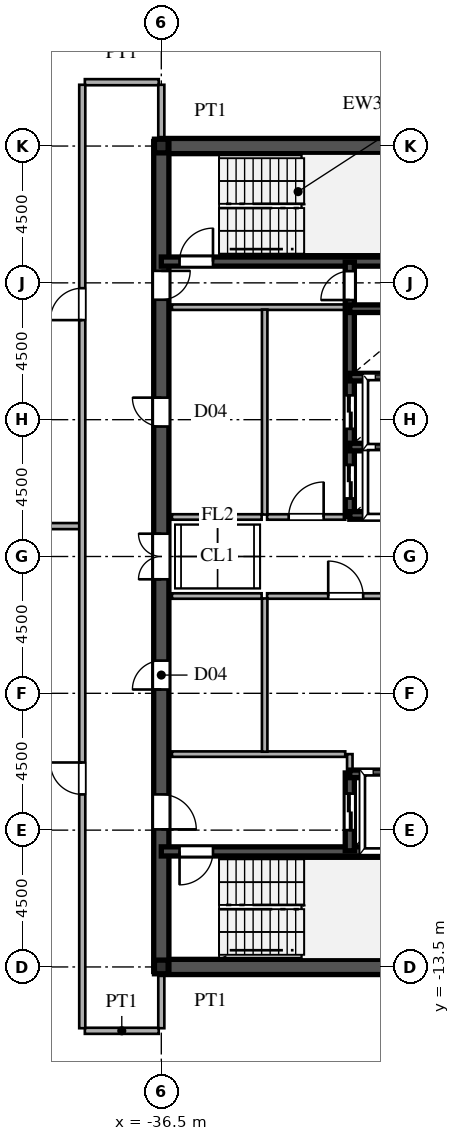
"""IFC4 building model, lengths in metres.
Left out: names, types, materials, properties, quantities, classifications, styles, units other than length and angle.
Written with IfcOpenShell. Run it as: python <this file> out.ifc"""

import sys

from ifc_helpers import new_model, si_unit, direction, frame, frame_2d, origin, origin_2d, place, context, subcontext, project, spatial, rectangle, i_section, extrude, source, transform, mapped, element, fill, save


model = new_model("IFC4")
c1 = context("Model", 3, precision=1e-05, world=origin(), true_north=direction((0.0, 1.0)))
c2 = subcontext(c1, "Body", "Model", "MODEL_VIEW")
j1 = project(units=[si_unit("LENGTHUNIT", "METRE"), si_unit("PLANEANGLEUNIT", "RADIAN")], contexts=[c1])
p1 = place(None, origin())
s1 = spatial("IfcSite", under=j1, at=p1, CompositionType="ELEMENT")
p2 = place(p1, origin())
s2 = spatial("IfcBuilding", under=s1, at=p2, CompositionType="ELEMENT")
p3 = place(p2, frame((0.0, 0.0, 265.65)))
s3 = spatial("IfcBuildingStorey", under=s2, at=p3, CompositionType="ELEMENT", Elevation=265.65)
m1 = source(origin(), c2, "Body", "SweptSolid", [
    extrude(i_section(OverallWidth=0.45, OverallDepth=0.45, WebThickness=0.016, FlangeThickness=0.025, at=origin_2d()), origin(), (0.0, 0.0, 1.0), 3.75),
])
for number, where, z_axis, x_axis in (
    (1, (-36.5, -13.5, 0.0), (0.0, 0.0, 1.0), (1.0, 0.0, 0.0)),
    (2, (-36.5, 13.5, 0.0), (0.0, 0.0, 1.0), (1.0, 0.0, 0.0)),
):
    element("IfcColumn", number, at=place(p3, frame(where, z_axis=z_axis, x_axis=x_axis)), inside=s3, PredefinedType="COLUMN", context=c2, shape_type="MappedRepresentation", body=[
        mapped(m1, transform((0.0, 0.0, 0.0), scale=1.0)),
    ])
for number, where, z_axis, x_axis in (
    (3, (-36.5, -13.5, 0.0), (0.0, 0.0, 1.0), (1.0, 0.0, 0.0)),
    (4, (-36.5, 13.5, 0.0), (0.0, 0.0, 1.0), (1.0, 0.0, 0.0)),
):
    element("IfcWall", number, at=place(p3, frame(where, z_axis=z_axis, x_axis=x_axis)), inside=s3, PredefinedType="SHEAR", context=c2, shape_type="SweptSolid", body=[
        extrude(rectangle(XDim=9.0, YDim=0.5, at=frame_2d((4.5, 0.0))), origin(), (0.0, 0.0, 1.0), 3.49),
    ])
p4 = place(p3, frame((-36.5, -13.65, 0.0), z_axis=(0.0, 0.0, 1.0), x_axis=(0.0, 1.0, 0.0)))
e5 = element("IfcWall", 5, at=p4, inside=s3, PredefinedType="SHEAR", context=c2, shape_type="SweptSolid", body=[
    extrude(rectangle(XDim=7.15, YDim=0.5, at=frame_2d((3.575, 0.0))), origin(), (0.0, 0.0, 1.0), 3.49),
])
p5 = place(p4, frame((4.675, 0.0, 0.0)))
e6 = element("IfcOpeningElement", 6, at=p5, cuts=e5, PredefinedType="OPENING", context=c2, shape_type="SweptSolid", body=[
    extrude(rectangle(XDim=1.15, YDim=2.2, at=frame_2d((0.575, 1.1))), frame((0.0, 0.26, 0.0), z_axis=(0.0, -1.0, 0.0), x_axis=(1.0, 0.0, 0.0)), (0.0, 0.0, 1.0), 0.52),
])
p6 = place(p3, frame((-36.5, -1.3, 0.0), z_axis=(0.0, 0.0, 1.0), x_axis=(0.0, 1.0, 0.0)))
e7 = element("IfcWall", 7, at=p6, inside=s3, PredefinedType="SHEAR", context=c2, shape_type="SweptSolid", body=[
    extrude(rectangle(XDim=2.6, YDim=0.5, at=frame_2d((1.3, 0.0))), origin(), (0.0, 0.0, 1.0), 3.49),
])
p7 = place(p6, frame((0.55, 0.0, 0.0)))
e8 = element("IfcOpeningElement", 8, at=p7, cuts=e7, PredefinedType="OPENING", context=c2, shape_type="SweptSolid", body=[
    extrude(rectangle(XDim=1.5, YDim=2.3, at=frame_2d((0.75, 1.15))), frame((0.0, 0.26, 0.0), z_axis=(0.0, -1.0, 0.0), x_axis=(1.0, 0.0, 0.0)), (0.0, 0.0, 1.0), 0.52),
])
p8 = place(p3, frame((-36.5, 8.2, 0.0), z_axis=(0.0, 0.0, 1.0), x_axis=(0.0, 1.0, 0.0)))
e9 = element("IfcWall", 9, at=p8, inside=s3, PredefinedType="SHEAR", context=c2, shape_type="SweptSolid", body=[
    extrude(rectangle(XDim=5.45, YDim=0.5, at=frame_2d((2.725, 0.0))), origin(), (0.0, 0.0, 1.0), 3.49),
])
p9 = place(p8, frame((0.245, 0.0, 0.0)))
e10 = element("IfcOpeningElement", 10, at=p9, cuts=e9, PredefinedType="OPENING", context=c2, shape_type="SweptSolid", body=[
    extrude(rectangle(XDim=0.95, YDim=2.15, at=frame_2d((0.475, 1.075))), frame((0.0, 0.26, 0.0), z_axis=(0.0, -1.0, 0.0), x_axis=(1.0, 0.0, 0.0)), (0.0, 0.0, 1.0), 0.52),
])
p10 = place(p3, frame((-36.5, -6.5, 0.0), z_axis=(0.0, 0.0, 1.0), x_axis=(0.0, 1.0, 0.0)))
e11 = element("IfcWall", 11, at=p10, inside=s3, PredefinedType="SHEAR", context=c2, shape_type="SweptSolid", body=[
    extrude(rectangle(XDim=5.2, YDim=0.5, at=frame_2d((2.6, 0.0))), origin(), (0.0, 0.0, 1.0), 3.49),
])
p11 = place(p10, frame((2.125, 0.0, 0.0)))
e12 = element("IfcOpeningElement", 12, at=p11, cuts=e11, PredefinedType="OPENING", context=c2, shape_type="SweptSolid", body=[
    extrude(rectangle(XDim=0.95, YDim=2.15, at=frame_2d((0.475, 1.075))), frame((0.0, 0.26, 0.0), z_axis=(0.0, -1.0, 0.0), x_axis=(1.0, 0.0, 0.0)), (0.0, 0.0, 1.0), 0.52),
])
p12 = place(p3, frame((-36.5, 1.3, 0.0), z_axis=(0.0, 0.0, 1.0), x_axis=(0.0, 1.0, 0.0)))
e13 = element("IfcWall", 13, at=p12, inside=s3, PredefinedType="SHEAR", context=c2, shape_type="SweptSolid", body=[
    extrude(rectangle(XDim=6.9, YDim=0.5, at=frame_2d((3.45, 0.0))), origin(), (0.0, 0.0, 1.0), 3.49),
])
p13 = place(p12, frame((2.975, 0.0, 0.0)))
e14 = element("IfcOpeningElement", 14, at=p13, cuts=e13, PredefinedType="OPENING", context=c2, shape_type="SweptSolid", body=[
    extrude(rectangle(XDim=0.95, YDim=2.15, at=frame_2d((0.475, 1.075))), frame((0.0, 0.26, 0.0), z_axis=(0.0, -1.0, 0.0), x_axis=(1.0, 0.0, 0.0)), (0.0, 0.0, 1.0), 0.52),
])
p14 = place(p3, frame((-36.5, -9.7, 0.0), z_axis=(0.0, 0.0, 1.0), x_axis=(1.0, 0.0, 0.0)))
e15 = element("IfcWall", 15, at=p14, inside=s3, PredefinedType="SHEAR", context=c2, shape_type="SweptSolid", body=[
    extrude(rectangle(XDim=9.0, YDim=0.3, at=frame_2d((4.5, 0.0))), origin(), (0.0, 0.0, 1.0), 3.49),
])
p15 = place(p14, frame((0.6, 0.0, 0.0)))
e16 = element("IfcOpeningElement", 16, at=p15, cuts=e15, PredefinedType="OPENING", context=c2, shape_type="SweptSolid", body=[
    extrude(rectangle(XDim=1.1, YDim=2.2, at=frame_2d((0.55, 1.1))), frame((0.0, 0.16, 0.0), z_axis=(0.0, -1.0, 0.0), x_axis=(1.0, 0.0, 0.0)), (0.0, 0.0, 1.0), 0.32),
])
p16 = place(p3, frame((-36.5, 9.7, 0.0), z_axis=(0.0, 0.0, 1.0), x_axis=(1.0, 0.0, 0.0)))
e17 = element("IfcWall", 17, at=p16, inside=s3, PredefinedType="SHEAR", context=c2, shape_type="SweptSolid", body=[
    extrude(rectangle(XDim=9.0, YDim=0.3, at=frame_2d((4.5, 0.0))), origin(), (0.0, 0.0, 1.0), 3.49),
])
p17 = place(p16, frame((0.6, 0.0, 0.0)))
e18 = element("IfcOpeningElement", 18, at=p17, cuts=e17, PredefinedType="OPENING", context=c2, shape_type="SweptSolid", body=[
    extrude(rectangle(XDim=1.1, YDim=2.2, at=frame_2d((0.55, 1.1))), frame((0.0, 0.16, 0.0), z_axis=(0.0, -1.0, 0.0), x_axis=(1.0, 0.0, 0.0)), (0.0, 0.0, 1.0), 0.32),
])
for number, where, z_axis, x_axis in (
    (19, (-30.3, -7.15, 0.0), (0.0, 0.0, 1.0), (1.0, 0.0, 0.0)),
    (20, (-30.3, 1.35, 0.0), (0.0, 0.0, 1.0), (1.0, 0.0, 0.0)),
    (21, (-30.3, 3.6, 0.0), (0.0, 0.0, 1.0), (1.0, 0.0, 0.0)),
    (22, (-30.3, 5.9, 0.0), (0.0, 0.0, 1.0), (1.0, 0.0, 0.0)),
    (23, (-30.3, 8.15, 0.0), (0.0, 0.0, 1.0), (1.0, 0.0, 0.0)),
):
    element("IfcWall", number, at=place(p3, frame(where, z_axis=z_axis, x_axis=x_axis)), inside=s3, PredefinedType="SHEAR", context=c2, shape_type="SweptSolid", body=[
        extrude(rectangle(XDim=2.8, YDim=0.25, at=frame_2d((1.4, 0.0))), origin(), (0.0, 0.0, 1.0), 3.49),
    ])
p18 = place(p3, frame((-30.3, -9.68, 0.0), z_axis=(0.0, 0.0, 1.0), x_axis=(0.0, 1.0, 0.0)))
e24 = element("IfcWall", 24, at=p18, inside=s3, PredefinedType="SHEAR", context=c2, shape_type="SweptSolid", body=[
    extrude(rectangle(XDim=2.56, YDim=0.3, at=frame_2d((1.28, 0.0))), origin(), (0.0, 0.0, 1.0), 3.49),
])
p19 = place(p18, frame((0.68, 0.0, 0.0)))
e25 = element("IfcOpeningElement", 25, at=p19, cuts=e24, PredefinedType="OPENING", context=c2, shape_type="SweptSolid", body=[
    extrude(rectangle(XDim=1.2, YDim=2.25, at=frame_2d((0.6, 1.125))), frame((0.0, 0.16, 0.0), z_axis=(0.0, -1.0, 0.0), x_axis=(1.0, 0.0, 0.0)), (0.0, 0.0, 1.0), 0.32),
])
p20 = place(p3, frame((-30.3, 1.32, 0.0), z_axis=(0.0, 0.0, 1.0), x_axis=(0.0, 1.0, 0.0)))
e26 = element("IfcWall", 26, at=p20, inside=s3, PredefinedType="SHEAR", context=c2, shape_type="SweptSolid", body=[
    extrude(rectangle(XDim=2.28, YDim=0.3, at=frame_2d((1.14, 0.0))), origin(), (0.0, 0.0, 1.0), 3.49),
])
p21 = place(p20, frame((0.59, 0.0, 0.0)))
e27 = element("IfcOpeningElement", 27, at=p21, cuts=e26, PredefinedType="OPENING", context=c2, shape_type="SweptSolid", body=[
    extrude(rectangle(XDim=1.1, YDim=2.2, at=frame_2d((0.55, 1.1))), frame((0.0, 0.16, 0.0), z_axis=(0.0, -1.0, 0.0), x_axis=(1.0, 0.0, 0.0)), (0.0, 0.0, 1.0), 0.32),
])
p22 = place(p3, frame((-30.3, 3.6, 0.0), z_axis=(0.0, 0.0, 1.0), x_axis=(0.0, 1.0, 0.0)))
e28 = element("IfcWall", 28, at=p22, inside=s3, PredefinedType="SHEAR", context=c2, shape_type="SweptSolid", body=[
    extrude(rectangle(XDim=2.3, YDim=0.3, at=frame_2d((1.15, 0.0))), origin(), (0.0, 0.0, 1.0), 3.49),
])
p23 = place(p22, frame((0.6, 0.0, 0.0)))
e29 = element("IfcOpeningElement", 29, at=p23, cuts=e28, PredefinedType="OPENING", context=c2, shape_type="SweptSolid", body=[
    extrude(rectangle(XDim=1.1, YDim=2.2, at=frame_2d((0.55, 1.1))), frame((0.0, 0.16, 0.0), z_axis=(0.0, -1.0, 0.0), x_axis=(1.0, 0.0, 0.0)), (0.0, 0.0, 1.0), 0.32),
])
p24 = place(p3, frame((-30.3, 5.9, 0.0), z_axis=(0.0, 0.0, 1.0), x_axis=(0.0, 1.0, 0.0)))
e30 = element("IfcWall", 30, at=p24, inside=s3, PredefinedType="SHEAR", context=c2, shape_type="SweptSolid", body=[
    extrude(rectangle(XDim=2.25, YDim=0.3, at=frame_2d((1.125, 0.0))), origin(), (0.0, 0.0, 1.0), 3.49),
])
p25 = place(p3, frame((-30.3, 8.15, 0.0), z_axis=(0.0, 0.0, 1.0), x_axis=(0.0, 1.0, 0.0)))
e31 = element("IfcWall", 31, at=p25, inside=s3, PredefinedType="SHEAR", context=c2, shape_type="SweptSolid", body=[
    extrude(rectangle(XDim=1.53, YDim=0.3, at=frame_2d((0.765, 0.0))), origin(), (0.0, 0.0, 1.0), 3.49),
])
p26 = place(p25, frame((0.285, 0.0, 0.0)))
e32 = element("IfcOpeningElement", 32, at=p26, cuts=e31, PredefinedType="OPENING", context=c2, shape_type="SweptSolid", body=[
    extrude(rectangle(XDim=0.95, YDim=2.15, at=frame_2d((0.475, 1.075))), frame((0.0, 0.16, 0.0), z_axis=(0.0, -1.0, 0.0), x_axis=(1.0, 0.0, 0.0)), (0.0, 0.0, 1.0), 0.32),
])
p27 = place(p3, frame((-36.15, -6.5, 0.0), z_axis=(0.0, 0.0, 1.0), x_axis=(1.0, 0.0, 0.0)))
e33 = element("IfcWall", 33, at=p27, inside=s3, PredefinedType="PARTITIONING", context=c2, shape_type="SweptSolid", body=[
    extrude(rectangle(XDim=5.7, YDim=0.18, at=frame_2d((2.85, 0.0))), origin(), (0.0, 0.0, 1.0), 3.49),
])
p28 = place(p3, frame((-30.3, -7.12, 0.0), z_axis=(0.0, 0.0, 1.0), x_axis=(0.0, 1.0, 0.0)))
e34 = element("IfcWall", 34, at=p28, inside=s3, PredefinedType="PARTITIONING", context=c2, shape_type="SweptSolid", body=[
    extrude(rectangle(XDim=0.62, YDim=0.18, at=frame_2d((0.31, 0.0))), origin(), (0.0, 0.0, 1.0), 3.49),
])
p29 = place(p3, frame((-36.15, 8.2, 0.0), z_axis=(0.0, 0.0, 1.0), x_axis=(1.0, 0.0, 0.0)))
e35 = element("IfcWall", 35, at=p29, inside=s3, PredefinedType="PARTITIONING", context=c2, shape_type="SweptSolid", body=[
    extrude(rectangle(XDim=5.7, YDim=0.18, at=frame_2d((2.85, 0.0))), origin(), (0.0, 0.0, 1.0), 3.49),
])
p30 = place(p3, frame((-33.1, -6.42, 0.0), z_axis=(0.0, 0.0, 1.0), x_axis=(0.0, 1.0, 0.0)))
e36 = element("IfcWall", 36, at=p30, inside=s3, PredefinedType="PARTITIONING", context=c2, shape_type="SweptSolid", body=[
    extrude(rectangle(XDim=5.04, YDim=0.18, at=frame_2d((2.52, 0.0))), origin(), (0.0, 0.0, 1.0), 3.49),
])
p31 = place(p3, frame((-33.1, 1.38, 0.0), z_axis=(0.0, 0.0, 1.0), x_axis=(0.0, 1.0, 0.0)))
e37 = element("IfcWall", 37, at=p31, inside=s3, PredefinedType="PARTITIONING", context=c2, shape_type="SweptSolid", body=[
    extrude(rectangle(XDim=6.74, YDim=0.18, at=frame_2d((3.37, 0.0))), origin(), (0.0, 0.0, 1.0), 3.49),
])
p32 = place(p3, frame((-33.02, -1.3, 0.0), z_axis=(0.0, 0.0, 1.0), x_axis=(1.0, 0.0, 0.0)))
e38 = element("IfcWall", 38, at=p32, inside=s3, PredefinedType="PARTITIONING", context=c2, shape_type="SweptSolid", body=[
    extrude(rectangle(XDim=5.17, YDim=0.18, at=frame_2d((2.585, 0.0))), origin(), (0.0, 0.0, 1.0), 3.49),
])
p33 = place(p32, frame((2.01, 0.0, 0.0)))
e39 = element("IfcOpeningElement", 39, at=p33, cuts=e38, PredefinedType="OPENING", context=c2, shape_type="SweptSolid", body=[
    extrude(rectangle(XDim=1.15, YDim=2.2, at=frame_2d((0.575, 1.1))), frame((0.0, 0.1, 0.0), z_axis=(0.0, -1.0, 0.0), x_axis=(1.0, 0.0, 0.0)), (0.0, 0.0, 1.0), 0.2),
])
p34 = place(p3, frame((-33.02, 1.3, 0.0), z_axis=(0.0, 0.0, 1.0), x_axis=(1.0, 0.0, 0.0)))
e40 = element("IfcWall", 40, at=p34, inside=s3, PredefinedType="PARTITIONING", context=c2, shape_type="SweptSolid", body=[
    extrude(rectangle(XDim=2.57, YDim=0.18, at=frame_2d((1.285, 0.0))), origin(), (0.0, 0.0, 1.0), 3.49),
])
p35 = place(p34, frame((0.71, 0.0, 0.0)))
e41 = element("IfcOpeningElement", 41, at=p35, cuts=e40, PredefinedType="OPENING", context=c2, shape_type="SweptSolid", body=[
    extrude(rectangle(XDim=1.15, YDim=2.2, at=frame_2d((0.575, 1.1))), frame((0.0, 0.1, 0.0), z_axis=(0.0, -1.0, 0.0), x_axis=(1.0, 0.0, 0.0)), (0.0, 0.0, 1.0), 0.2),
])
for number, where, z_axis, x_axis in (
    (42, (-36.15, -1.3, 0.0), (0.0, 0.0, 1.0), (1.0, 0.0, 0.0)),
    (43, (-36.15, 1.3, 0.0), (0.0, 0.0, 1.0), (1.0, 0.0, 0.0)),
):
    element("IfcWall", number, at=place(p3, frame(where, z_axis=z_axis, x_axis=x_axis)), inside=s3, PredefinedType="PARTITIONING", context=c2, shape_type="SweptSolid", body=[
        extrude(rectangle(XDim=2.95, YDim=0.18, at=frame_2d((1.475, 0.0))), origin(), (0.0, 0.0, 1.0), 3.49),
    ])
p36 = place(p3, frame((-39.015, -15.6, 0.0), z_axis=(0.0, 0.0, 1.0), x_axis=(1.0, 0.0, 0.0)))
e44 = element("IfcWall", 44, at=p36, inside=s3, PredefinedType="PARTITIONING", context=c2, shape_type="SweptSolid", body=[
    extrude(rectangle(XDim=2.43, YDim=0.2, at=frame_2d((1.215, 0.0))), origin(), (0.0, 0.0, 1.0), 3.49),
])
p37 = place(p3, frame((-67.375, 1.0, 0.0), z_axis=(0.0, 0.0, 1.0), x_axis=(1.0, 0.0, 0.0)))
e45 = element("IfcWall", 45, at=p37, inside=s3, PredefinedType="PARTITIONING", context=c2, shape_type="SweptSolid", body=[
    extrude(rectangle(XDim=28.195, YDim=0.2, at=frame_2d((14.098, 0.0))), origin(), (0.0, 0.0, 1.0), 3.49),
])
p38 = place(p3, frame((-39.015, 15.6, 0.0), z_axis=(0.0, 0.0, 1.0), x_axis=(1.0, 0.0, 0.0)))
e46 = element("IfcWall", 46, at=p38, inside=s3, PredefinedType="PARTITIONING", context=c2, shape_type="SweptSolid", body=[
    extrude(rectangle(XDim=2.43, YDim=0.2, at=frame_2d((1.215, 0.0))), origin(), (0.0, 0.0, 1.0), 3.49),
])
p39 = place(p3, frame((-39.1, -15.515, 0.0), z_axis=(0.0, 0.0, 1.0), x_axis=(0.0, 1.0, 0.0)))
e47 = element("IfcWall", 47, at=p39, inside=s3, PredefinedType="PARTITIONING", context=c2, shape_type="SweptSolid", body=[
    extrude(rectangle(XDim=31.03, YDim=0.2, at=frame_2d((15.515, 0.0))), origin(), (0.0, 0.0, 1.0), 3.49),
])
p40 = place(p39, frame((7.69, 0.0, 0.0)))
e48 = element("IfcOpeningElement", 48, at=p40, cuts=e47, PredefinedType="OPENING", context=c2, shape_type="SweptSolid", body=[
    extrude(rectangle(XDim=1.05, YDim=2.25, at=frame_2d((0.525, 1.125))), frame((0.0, 0.11, 0.0), z_axis=(0.0, -1.0, 0.0), x_axis=(1.0, 0.0, 0.0)), (0.0, 0.0, 1.0), 0.22),
])
p41 = place(p39, frame((23.29, 0.0, 0.0)))
e49 = element("IfcOpeningElement", 49, at=p41, cuts=e47, PredefinedType="OPENING", context=c2, shape_type="SweptSolid", body=[
    extrude(rectangle(XDim=1.05, YDim=2.25, at=frame_2d((0.525, 1.125))), frame((0.0, 0.11, 0.0), z_axis=(0.0, -1.0, 0.0), x_axis=(1.0, 0.0, 0.0)), (0.0, 0.0, 1.0), 0.22),
])
for number, where, z_axis, x_axis in (
    (50, (-36.5, -15.515, 0.0), (0.0, 0.0, 1.0), (0.0, 1.0, 0.0)),
    (51, (-36.5, 13.755, 0.0), (0.0, 0.0, 1.0), (0.0, 1.0, 0.0)),
):
    element("IfcWall", number, at=place(p3, frame(where, z_axis=z_axis, x_axis=x_axis)), inside=s3, PredefinedType="PARTITIONING", context=c2, shape_type="SweptSolid", body=[
        extrude(rectangle(XDim=1.76, YDim=0.2, at=frame_2d((0.88, 0.0))), origin(), (0.0, 0.0, 1.0), 2.89),
    ])
m2 = source(origin(), c2, "Body", "SweptSolid", [
    extrude(rectangle(XDim=1.15, YDim=2.2, at=frame_2d((0.575, 1.1))), frame((0.0, 0.025, 0.0), z_axis=(0.0, -1.0, 0.0), x_axis=(1.0, 0.0, 0.0)), (0.0, 0.0, 1.0), 0.05),
])
p42 = place(p5, frame((1.15, 0.0, 0.0), z_axis=(0.0, 0.0, 1.0), x_axis=(-1.0, 0.0, 0.0)))
e52 = element("IfcDoor", 52, at=p42, inside=s3, OperationType="SINGLE_SWING_LEFT", PredefinedType="DOOR", context=c2, shape_type="MappedRepresentation", body=[
    mapped(m2, transform((0.0, 0.0, 0.0), scale=1.0)),
])
fill(e6, e52)
m3 = source(origin(), c2, "Body", "SweptSolid", [
    extrude(rectangle(XDim=1.5, YDim=2.3, at=frame_2d((0.75, 1.15))), frame((0.0, 0.025, 0.0), z_axis=(0.0, -1.0, 0.0), x_axis=(1.0, 0.0, 0.0)), (0.0, 0.0, 1.0), 0.05),
])
p43 = place(p7, origin())
e53 = element("IfcDoor", 53, at=p43, inside=s3, OperationType="DOUBLE_SWING_LEFT", PredefinedType="DOOR", context=c2, shape_type="MappedRepresentation", body=[
    mapped(m3, transform((0.0, 0.0, 0.0), scale=1.0)),
])
fill(e8, e53)
m4 = source(origin(), c2, "Body", "SweptSolid", [
    extrude(rectangle(XDim=0.95, YDim=2.15, at=frame_2d((0.475, 1.075))), frame((0.0, 0.025, 0.0), z_axis=(0.0, -1.0, 0.0), x_axis=(1.0, 0.0, 0.0)), (0.0, 0.0, 1.0), 0.05),
])
p44 = place(p9, frame((0.95, 0.0, 0.0), z_axis=(0.0, 0.0, 1.0), x_axis=(-1.0, 0.0, 0.0)))
e54 = element("IfcDoor", 54, at=p44, inside=s3, OperationType="SINGLE_SWING_RIGHT", PredefinedType="DOOR", context=c2, shape_type="MappedRepresentation", body=[
    mapped(m4, transform((0.0, 0.0, 0.0), scale=1.0)),
])
fill(e10, e54)
p45 = place(p11, origin())
e55 = element("IfcDoor", 55, at=p45, inside=s3, OperationType="SINGLE_SWING_LEFT", PredefinedType="DOOR", context=c2, shape_type="MappedRepresentation", body=[
    mapped(m4, transform((0.0, 0.0, 0.0), scale=1.0)),
])
fill(e12, e55)
p46 = place(p13, origin())
e56 = element("IfcDoor", 56, at=p46, inside=s3, OperationType="SINGLE_SWING_RIGHT", PredefinedType="DOOR", context=c2, shape_type="MappedRepresentation", body=[
    mapped(m4, transform((0.0, 0.0, 0.0), scale=1.0)),
])
fill(e14, e56)
m5 = source(origin(), c2, "Body", "SweptSolid", [
    extrude(rectangle(XDim=1.1, YDim=2.2, at=frame_2d((0.55, 1.1))), frame((0.0, 0.025, 0.0), z_axis=(0.0, -1.0, 0.0), x_axis=(1.0, 0.0, 0.0)), (0.0, 0.0, 1.0), 0.05),
])
p47 = place(p15, frame((1.1, 0.0, 0.0), z_axis=(0.0, 0.0, 1.0), x_axis=(-1.0, 0.0, 0.0)))
e57 = element("IfcDoor", 57, at=p47, inside=s3, OperationType="SINGLE_SWING_LEFT", PredefinedType="DOOR", context=c2, shape_type="MappedRepresentation", body=[
    mapped(m5, transform((0.0, 0.0, 0.0), scale=1.0)),
])
fill(e16, e57)
p48 = place(p17, origin())
e58 = element("IfcDoor", 58, at=p48, inside=s3, OperationType="SINGLE_SWING_RIGHT", PredefinedType="DOOR", context=c2, shape_type="MappedRepresentation", body=[
    mapped(m5, transform((0.0, 0.0, 0.0), scale=1.0)),
])
fill(e18, e58)
m6 = source(origin(), c2, "Body", "SweptSolid", [
    extrude(rectangle(XDim=1.2, YDim=2.25, at=frame_2d((0.6, 1.125))), frame((0.0, 0.025, 0.0), z_axis=(0.0, -1.0, 0.0), x_axis=(1.0, 0.0, 0.0)), (0.0, 0.0, 1.0), 0.05),
])
p49 = place(p19, origin())
e59 = element("IfcDoor", 59, at=p49, inside=s3, OperationType="DOUBLE_DOOR_SLIDING", PredefinedType="DOOR", context=c2, shape_type="MappedRepresentation", body=[
    mapped(m6, transform((0.0, 0.0, 0.0), scale=1.0)),
])
fill(e25, e59)
m7 = source(origin(), c2, "Body", "SweptSolid", [
    extrude(rectangle(XDim=1.1, YDim=2.2, at=frame_2d((0.55, 1.1))), frame((0.0, 0.025, 0.0), z_axis=(0.0, -1.0, 0.0), x_axis=(1.0, 0.0, 0.0)), (0.0, 0.0, 1.0), 0.05),
])
p50 = place(p21, origin())
e60 = element("IfcDoor", 60, at=p50, inside=s3, OperationType="DOUBLE_DOOR_SLIDING", PredefinedType="DOOR", context=c2, shape_type="MappedRepresentation", body=[
    mapped(m7, transform((0.0, 0.0, 0.0), scale=1.0)),
])
fill(e27, e60)
p51 = place(p23, origin())
e61 = element("IfcDoor", 61, at=p51, inside=s3, OperationType="DOUBLE_DOOR_SLIDING", PredefinedType="DOOR", context=c2, shape_type="MappedRepresentation", body=[
    mapped(m7, transform((0.0, 0.0, 0.0), scale=1.0)),
])
fill(e29, e61)
p52 = place(p26, origin())
e62 = element("IfcDoor", 62, at=p52, inside=s3, OperationType="SINGLE_SWING_LEFT", PredefinedType="DOOR", context=c2, shape_type="MappedRepresentation", body=[
    mapped(m4, transform((0.0, 0.0, 0.0), scale=1.0)),
])
fill(e32, e62)
p53 = place(p33, origin())
e63 = element("IfcDoor", 63, at=p53, inside=s3, OperationType="SINGLE_SWING_LEFT", PredefinedType="DOOR", context=c2, shape_type="MappedRepresentation", body=[
    mapped(m2, transform((0.0, 0.0, 0.0), scale=1.0)),
])
fill(e39, e63)
p54 = place(p35, origin())
e64 = element("IfcDoor", 64, at=p54, inside=s3, OperationType="SINGLE_SWING_RIGHT", PredefinedType="DOOR", context=c2, shape_type="MappedRepresentation", body=[
    mapped(m2, transform((0.0, 0.0, 0.0), scale=1.0)),
])
fill(e41, e64)
m8 = source(origin(), c2, "Body", "SweptSolid", [
    extrude(rectangle(XDim=1.05, YDim=2.25, at=frame_2d((0.525, 1.125))), frame((0.0, 0.025, 0.0), z_axis=(0.0, -1.0, 0.0), x_axis=(1.0, 0.0, 0.0)), (0.0, 0.0, 1.0), 0.05),
])
p55 = place(p40, origin())
e65 = element("IfcDoor", 65, at=p55, inside=s3, OperationType="SINGLE_SWING_RIGHT", PredefinedType="DOOR", context=c2, shape_type="MappedRepresentation", body=[
    mapped(m8, transform((0.0, 0.0, 0.0), scale=1.0)),
])
fill(e48, e65)
p56 = place(p41, origin())
e66 = element("IfcDoor", 66, at=p56, inside=s3, OperationType="SINGLE_SWING_LEFT", PredefinedType="DOOR", context=c2, shape_type="MappedRepresentation", body=[
    mapped(m8, transform((0.0, 0.0, 0.0), scale=1.0)),
])
fill(e49, e66)
save(model, sys.argv[1])
